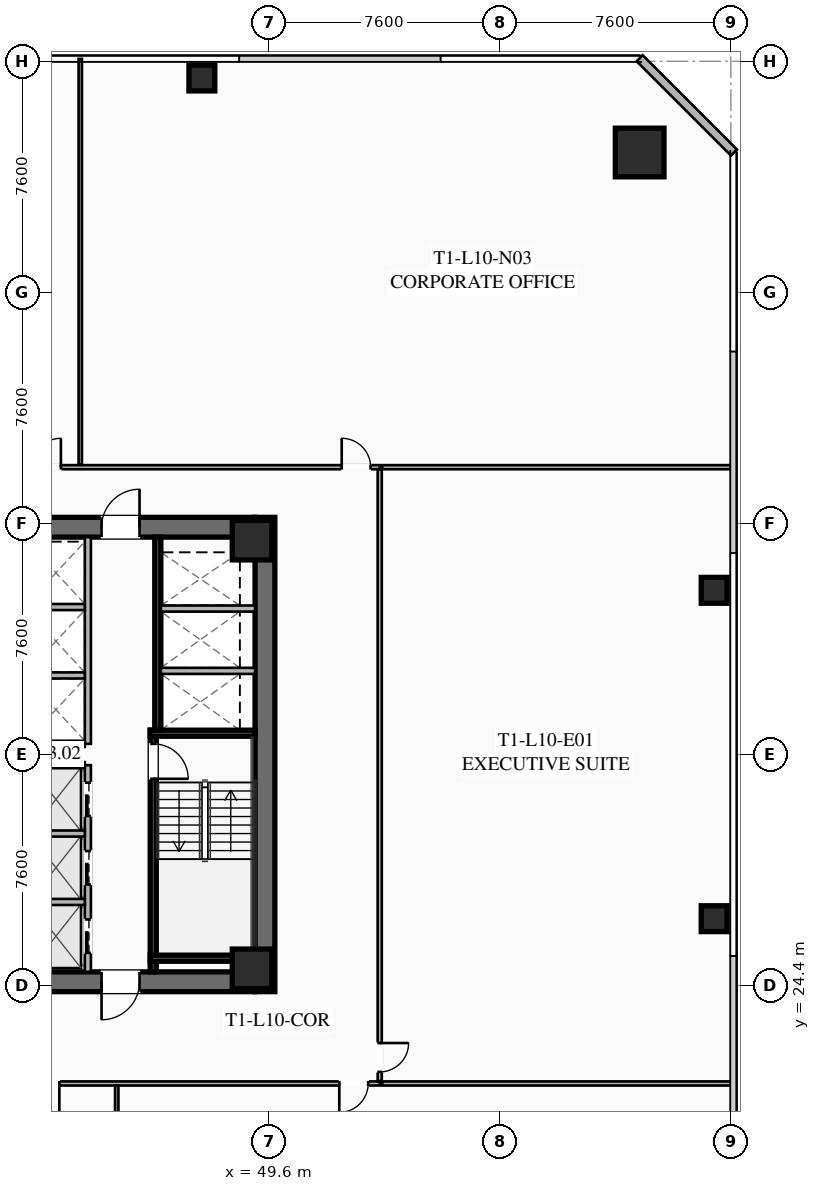
"""IFC4 building model, lengths in metres.
Left out: names, types, materials, properties, quantities, classifications, styles, units other than length and angle.
Written with IfcOpenShell. Run it as: python <this file> out.ifc"""

import sys

from ifc_helpers import new_model, si_unit, direction, frame, frame_2d, origin, origin_2d, place, context, subcontext, project, spatial, rectangle, hollow_rectangle, extrude, element, fill, save


model = new_model("IFC4")
c1 = context("Model", 3, precision=1e-05, world=origin(), true_north=direction((0.0, 1.0)))
c2 = subcontext(c1, "Body", "Model", "MODEL_VIEW")
j1 = project(units=[si_unit("LENGTHUNIT", "METRE"), si_unit("PLANEANGLEUNIT", "RADIAN")], contexts=[c1])
p1 = place(None, origin())
s1 = spatial("IfcSite", under=j1, at=p1, CompositionType="ELEMENT")
p2 = place(p1, origin())
s2 = spatial("IfcBuilding", under=s1, at=p2, CompositionType="ELEMENT")
p3 = place(p2, frame((0.0, 0.0, 42.35)))
s3 = spatial("IfcBuildingStorey", under=s2, at=p3, CompositionType="ELEMENT", Elevation=42.35)
p4 = place(p3, frame((49.475, 39.8, 0.0), z_axis=(0.0, 0.0, 1.0), x_axis=(0.0, -1.0, 0.0)))
e1 = element("IfcWall", 1, at=p4, inside=s3, PredefinedType="SHEAR", context=c2, shape_type="SweptSolid", body=[
    extrude(rectangle(XDim=15.6, YDim=0.65, at=frame_2d((7.8, 0.0))), origin(), (0.0, 0.0, 1.0), 3.55),
])
p5 = place(p3, frame((49.15, 24.525, 0.0), z_axis=(0.0, 0.0, 1.0), x_axis=(-1.0, 0.0, 0.0)))
e2 = element("IfcWall", 2, at=p5, inside=s3, PredefinedType="SHEAR", context=c2, shape_type="SweptSolid", body=[
    extrude(rectangle(XDim=14.3, YDim=0.65, at=frame_2d((7.15, 0.0))), origin(), (0.0, 0.0, 1.0), 3.55),
])
p6 = place(p5, frame((8.85, 0.0, 0.0)))
e3 = element("IfcOpeningElement", 3, at=p6, cuts=e2, PredefinedType="OPENING", context=c2, shape_type="SweptSolid", body=[
    extrude(rectangle(XDim=1.25, YDim=2.25, at=frame_2d((0.625, 1.125))), frame((0.0, 0.335, 0.0), z_axis=(0.0, -1.0, 0.0), x_axis=(1.0, 0.0, 0.0)), (0.0, 0.0, 1.0), 0.67),
])
p7 = place(p5, frame((3.8, 0.0, 0.0)))
e4 = element("IfcOpeningElement", 4, at=p7, cuts=e2, PredefinedType="OPENING", context=c2, shape_type="SweptSolid", body=[
    extrude(rectangle(XDim=1.25, YDim=2.25, at=frame_2d((0.625, 1.125))), frame((0.0, 0.335, 0.0), z_axis=(0.0, -1.0, 0.0), x_axis=(1.0, 0.0, 0.0)), (0.0, 0.0, 1.0), 0.67),
])
p8 = place(p3, frame((34.85, 39.475, 0.0), z_axis=(0.0, 0.0, 1.0), x_axis=(1.0, 0.0, 0.0)))
e5 = element("IfcWall", 5, at=p8, inside=s3, PredefinedType="SHEAR", context=c2, shape_type="SweptSolid", body=[
    extrude(rectangle(XDim=14.3, YDim=0.65, at=frame_2d((7.15, 0.0))), origin(), (0.0, 0.0, 1.0), 3.55),
])
p9 = place(p8, frame((4.2, 0.0, 0.0)))
e6 = element("IfcOpeningElement", 6, at=p9, cuts=e5, PredefinedType="OPENING", context=c2, shape_type="SweptSolid", body=[
    extrude(rectangle(XDim=1.25, YDim=2.25, at=frame_2d((0.625, 1.125))), frame((0.0, 0.335, 0.0), z_axis=(0.0, -1.0, 0.0), x_axis=(1.0, 0.0, 0.0)), (0.0, 0.0, 1.0), 0.67),
])
p10 = place(p8, frame((9.25, 0.0, 0.0)))
e7 = element("IfcOpeningElement", 7, at=p10, cuts=e5, PredefinedType="OPENING", context=c2, shape_type="SweptSolid", body=[
    extrude(rectangle(XDim=1.25, YDim=2.25, at=frame_2d((0.625, 1.125))), frame((0.0, 0.335, 0.0), z_axis=(0.0, -1.0, 0.0), x_axis=(1.0, 0.0, 0.0)), (0.0, 0.0, 1.0), 0.67),
])
for number, where, z_axis, x_axis in (
    (8, (49.05, 24.95, 0.0), (0.0, 0.0, 1.0), (1.0, 0.0, 0.0)),
    (9, (49.05, 39.05, 0.0), (0.0, 0.0, 1.0), (1.0, 0.0, 0.0)),
):
    element("IfcColumn", number, at=place(p3, frame(where, z_axis=z_axis, x_axis=x_axis)), inside=s3, PredefinedType="COLUMN", context=c2, shape_type="SweptSolid", body=[
        extrude(hollow_rectangle(XDim=1.3, YDim=1.3, WallThickness=0.05, at=origin_2d()), origin(), (0.0, 0.0, 1.0), 3.35),
    ])
p11 = place(p3, frame((61.8, 51.8, 0.0), z_axis=(0.0, 0.0, 1.0), x_axis=(1.0, 0.0, 0.0)))
e10 = element("IfcColumn", 10, at=p11, inside=s3, PredefinedType="COLUMN", context=c2, shape_type="SweptSolid", body=[
    extrude(hollow_rectangle(XDim=1.6, YDim=1.6, WallThickness=0.06, at=origin_2d()), origin(), (0.0, 0.0, 1.0), 3.35),
])
for number, where, z_axis, x_axis in (
    (11, (64.25, 26.6, 0.0), (0.0, 0.0, 1.0), (1.0, 0.0, 0.0)),
    (12, (64.25, 37.4, 0.0), (0.0, 0.0, 1.0), (1.0, 0.0, 0.0)),
    (13, (47.4, 54.25, 0.0), (0.0, 0.0, 1.0), (1.0, 0.0, 0.0)),
):
    element("IfcColumn", number, at=place(p3, frame(where, z_axis=z_axis, x_axis=x_axis)), inside=s3, PredefinedType="COLUMN", context=c2, shape_type="SweptSolid", body=[
        extrude(hollow_rectangle(XDim=0.85, YDim=0.85, WallThickness=0.035, at=origin_2d()), origin(), (0.0, 0.0, 1.0), 3.35),
    ])
p12 = place(p3, frame((61.8, 54.9, 0.0), z_axis=(0.0, 0.0, 1.0), x_axis=(0.707106781187, -0.707106781187, 0.0)))
e14 = element("IfcWall", 14, at=p12, inside=s3, PredefinedType="SOLIDWALL", context=c2, shape_type="SweptSolid", body=[
    extrude(rectangle(XDim=4.384, YDim=0.28, at=frame_2d((2.192, 0.0))), origin(), (0.0, 0.0, 1.0), 3.35),
])
p13 = place(p3, frame((45.8, 32.8, 0.0), z_axis=(0.0, 0.0, 1.0), x_axis=(0.0, -1.0, 0.0)))
e15 = element("IfcWall", 15, at=p13, inside=s3, PredefinedType="SHEAR", context=c2, shape_type="SweptSolid", body=[
    extrude(rectangle(XDim=7.95, YDim=0.2, at=frame_2d((3.975, 0.0))), origin(), (0.0, 0.0, 1.0), 3.35),
])
p14 = place(p13, frame((0.45, 0.0, 0.0)))
e16 = element("IfcOpeningElement", 16, at=p14, cuts=e15, PredefinedType="OPENING", context=c2, shape_type="SweptSolid", body=[
    extrude(rectangle(XDim=1.15, YDim=2.2, at=frame_2d((0.575, 1.1))), frame((0.0, 0.11, 0.0), z_axis=(0.0, -1.0, 0.0), x_axis=(1.0, 0.0, 0.0)), (0.0, 0.0, 1.0), 0.22),
])
for number, where, z_axis, x_axis in (
    (17, (45.7, 32.7, 0.0), (0.0, 0.0, 1.0), (1.0, 0.0, 0.0)),
    (18, (45.7, 25.3, 0.0), (0.0, 0.0, 1.0), (1.0, 0.0, 0.0)),
):
    element("IfcWall", number, at=place(p3, frame(where, z_axis=z_axis, x_axis=x_axis)), inside=s3, PredefinedType="SHEAR", context=c2, shape_type="SweptSolid", body=[
        extrude(rectangle(XDim=3.45, YDim=0.2, at=frame_2d((1.725, 0.0))), origin(), (0.0, 0.0, 1.0), 3.35),
    ])
p15 = place(p3, frame((45.95, 39.15, 0.0), z_axis=(0.0, 0.0, 1.0), x_axis=(0.0, -1.0, 0.0)))
e19 = element("IfcWall", 19, at=p15, inside=s3, PredefinedType="SHEAR", context=c2, shape_type="SweptSolid", body=[
    extrude(rectangle(XDim=6.35, YDim=0.2, at=frame_2d((3.175, 0.0))), origin(), (0.0, 0.0, 1.0), 3.35),
])
for number, where, z_axis, x_axis in (
    (20, (46.05, 34.75, 0.0), (0.0, 0.0, 1.0), (1.0, 0.0, 0.0)),
    (21, (46.05, 36.8, 0.0), (0.0, 0.0, 1.0), (1.0, 0.0, 0.0)),
):
    element("IfcWall", number, at=place(p3, frame(where, z_axis=z_axis, x_axis=x_axis)), inside=s3, PredefinedType="SOLIDWALL", context=c2, shape_type="SweptSolid", body=[
        extrude(rectangle(XDim=3.1, YDim=0.2, at=frame_2d((1.55, 0.0))), origin(), (0.0, 0.0, 1.0), 3.35),
    ])
p16 = place(p3, frame((43.65, 24.85, 0.0), z_axis=(0.0, 0.0, 1.0), x_axis=(0.0, 1.0, 0.0)))
e22 = element("IfcWall", 22, at=p16, inside=s3, PredefinedType="SOLIDWALL", context=c2, shape_type="SweptSolid", body=[
    extrude(rectangle(XDim=6.8, YDim=0.2, at=frame_2d((3.4, 0.0))), origin(), (0.0, 0.0, 1.0), 3.35),
])
p17 = place(p16, frame((0.625, 0.0, 0.0)))
e23 = element("IfcOpeningElement", 23, at=p17, cuts=e22, PredefinedType="OPENING", context=c2, shape_type="SweptSolid", body=[
    extrude(rectangle(XDim=1.1, YDim=2.2, at=frame_2d((0.55, 1.1))), frame((0.0, 0.11, 0.0), z_axis=(0.0, -1.0, 0.0), x_axis=(1.0, 0.0, 0.0)), (0.0, 0.0, 1.0), 0.22),
])
p18 = place(p16, frame((2.875, 0.0, 0.0)))
e24 = element("IfcOpeningElement", 24, at=p18, cuts=e22, PredefinedType="OPENING", context=c2, shape_type="SweptSolid", body=[
    extrude(rectangle(XDim=1.1, YDim=2.2, at=frame_2d((0.55, 1.1))), frame((0.0, 0.11, 0.0), z_axis=(0.0, -1.0, 0.0), x_axis=(1.0, 0.0, 0.0)), (0.0, 0.0, 1.0), 0.22),
])
p19 = place(p16, frame((5.125, 0.0, 0.0)))
e25 = element("IfcOpeningElement", 25, at=p19, cuts=e22, PredefinedType="OPENING", context=c2, shape_type="SweptSolid", body=[
    extrude(rectangle(XDim=1.1, YDim=2.2, at=frame_2d((0.55, 1.1))), frame((0.0, 0.11, 0.0), z_axis=(0.0, -1.0, 0.0), x_axis=(1.0, 0.0, 0.0)), (0.0, 0.0, 1.0), 0.22),
])
for number, where, z_axis, x_axis in (
    (26, (41.67, 27.15, 0.0), (0.0, 0.0, 1.0), (1.0, 0.0, 0.0)),
    (27, (41.67, 29.4, 0.0), (0.0, 0.0, 1.0), (1.0, 0.0, 0.0)),
    (28, (41.67, 31.65, 0.0), (0.0, 0.0, 1.0), (1.0, 0.0, 0.0)),
):
    element("IfcWall", number, at=place(p3, frame(where, z_axis=z_axis, x_axis=x_axis)), inside=s3, PredefinedType="SOLIDWALL", context=c2, shape_type="SweptSolid", body=[
        extrude(rectangle(XDim=1.88, YDim=0.2, at=frame_2d((0.94, 0.0))), origin(), (0.0, 0.0, 1.0), 3.35),
    ])
p20 = place(p3, frame((43.65, 32.35, 0.0), z_axis=(0.0, 0.0, 1.0), x_axis=(0.0, 1.0, 0.0)))
e29 = element("IfcWall", 29, at=p20, inside=s3, PredefinedType="SOLIDWALL", context=c2, shape_type="SweptSolid", body=[
    extrude(rectangle(XDim=6.8, YDim=0.2, at=frame_2d((3.4, 0.0))), origin(), (0.0, 0.0, 1.0), 3.35),
])
for number, where, z_axis, x_axis in (
    (30, (41.67, 32.35, 0.0), (0.0, 0.0, 1.0), (1.0, 0.0, 0.0)),
    (31, (41.67, 34.6, 0.0), (0.0, 0.0, 1.0), (1.0, 0.0, 0.0)),
    (32, (41.67, 36.85, 0.0), (0.0, 0.0, 1.0), (1.0, 0.0, 0.0)),
):
    element("IfcWall", number, at=place(p3, frame(where, z_axis=z_axis, x_axis=x_axis)), inside=s3, PredefinedType="SOLIDWALL", context=c2, shape_type="SweptSolid", body=[
        extrude(rectangle(XDim=1.88, YDim=0.2, at=frame_2d((0.94, 0.0))), origin(), (0.0, 0.0, 1.0), 3.35),
    ])
p21 = place(p3, frame((22.35, 41.45, 0.0), z_axis=(0.0, 0.0, 1.0), x_axis=(1.0, 0.0, 0.0)))
e33 = element("IfcWall", 33, at=p21, inside=s3, PredefinedType="PARTITIONING", context=c2, shape_type="SweptSolid", body=[
    extrude(rectangle(XDim=30.9, YDim=0.135, at=frame_2d((15.45, 0.0))), origin(), (0.0, 0.0, 1.0), 2.703),
])
p22 = place(p21, frame((0.3, 0.0, 0.0)))
e34 = element("IfcOpeningElement", 34, at=p22, cuts=e33, PredefinedType="OPENING", context=c2, shape_type="SweptSolid", body=[
    extrude(rectangle(XDim=0.95, YDim=2.05, at=frame_2d((0.475, 1.025))), frame((0.0, 0.077, 0.0), z_axis=(0.0, -1.0, 0.0), x_axis=(1.0, 0.0, 0.0)), (0.0, 0.0, 1.0), 0.155),
])
p23 = place(p21, frame((19.463, 0.0, 0.0)))
e35 = element("IfcOpeningElement", 35, at=p23, cuts=e33, PredefinedType="OPENING", context=c2, shape_type="SweptSolid", body=[
    extrude(rectangle(XDim=0.95, YDim=2.05, at=frame_2d((0.475, 1.025))), frame((0.0, 0.077, 0.0), z_axis=(0.0, -1.0, 0.0), x_axis=(1.0, 0.0, 0.0)), (0.0, 0.0, 1.0), 0.155),
])
p24 = place(p21, frame((29.65, 0.0, 0.0)))
e36 = element("IfcOpeningElement", 36, at=p24, cuts=e33, PredefinedType="OPENING", context=c2, shape_type="SweptSolid", body=[
    extrude(rectangle(XDim=0.95, YDim=2.05, at=frame_2d((0.475, 1.025))), frame((0.0, 0.077, 0.0), z_axis=(0.0, -1.0, 0.0), x_axis=(1.0, 0.0, 0.0)), (0.0, 0.0, 1.0), 0.155),
])
p25 = place(p3, frame((43.4, 41.53, 0.0), z_axis=(0.0, 0.0, 1.0), x_axis=(0.0, 1.0, 0.0)))
e37 = element("IfcWall", 37, at=p25, inside=s3, PredefinedType="PARTITIONING", context=c2, shape_type="SweptSolid", body=[
    extrude(rectangle(XDim=13.35, YDim=0.11, at=frame_2d((6.675, 0.0))), origin(), (0.0, 0.0, 1.0), 2.703),
])
p26 = place(p3, frame((53.25, 21.18, 0.0), z_axis=(0.0, 0.0, 1.0), x_axis=(-1.0, 0.0, 0.0)))
e38 = element("IfcWall", 38, at=p26, inside=s3, PredefinedType="PARTITIONING", context=c2, shape_type="SweptSolid", body=[
    extrude(rectangle(XDim=30.9, YDim=0.135, at=frame_2d((15.45, 0.0))), origin(), (0.0, 0.0, 1.0), 2.703),
])
p27 = place(p26, frame((29.57, 0.0, 0.0)))
e39 = element("IfcOpeningElement", 39, at=p27, cuts=e38, PredefinedType="OPENING", context=c2, shape_type="SweptSolid", body=[
    extrude(rectangle(XDim=0.95, YDim=2.05, at=frame_2d((0.475, 1.025))), frame((0.0, 0.077, 0.0), z_axis=(0.0, -1.0, 0.0), x_axis=(1.0, 0.0, 0.0)), (0.0, 0.0, 1.0), 0.155),
])
p28 = place(p26, frame((10.538, 0.0, 0.0)))
e40 = element("IfcOpeningElement", 40, at=p28, cuts=e38, PredefinedType="OPENING", context=c2, shape_type="SweptSolid", body=[
    extrude(rectangle(XDim=0.95, YDim=2.05, at=frame_2d((0.475, 1.025))), frame((0.0, 0.077, 0.0), z_axis=(0.0, -1.0, 0.0), x_axis=(1.0, 0.0, 0.0)), (0.0, 0.0, 1.0), 0.155),
])
p29 = place(p26, frame((0.38, 0.0, 0.0)))
e41 = element("IfcOpeningElement", 41, at=p29, cuts=e38, PredefinedType="OPENING", context=c2, shape_type="SweptSolid", body=[
    extrude(rectangle(XDim=0.95, YDim=2.05, at=frame_2d((0.475, 1.025))), frame((0.0, 0.077, 0.0), z_axis=(0.0, -1.0, 0.0), x_axis=(1.0, 0.0, 0.0)), (0.0, 0.0, 1.0), 0.155),
])
p30 = place(p3, frame((44.6, 9.12, 0.0), z_axis=(0.0, 0.0, 1.0), x_axis=(0.0, 1.0, 0.0)))
e42 = element("IfcWall", 42, at=p30, inside=s3, PredefinedType="PARTITIONING", context=c2, shape_type="SweptSolid", body=[
    extrude(rectangle(XDim=11.98, YDim=0.11, at=frame_2d((5.99, 0.0))), origin(), (0.0, 0.0, 1.0), 2.703),
])
p31 = place(p3, frame((53.25, 41.37, 0.0), z_axis=(0.0, 0.0, 1.0), x_axis=(0.0, -1.0, 0.0)))
e43 = element("IfcWall", 43, at=p31, inside=s3, PredefinedType="PARTITIONING", context=c2, shape_type="SweptSolid", body=[
    extrude(rectangle(XDim=20.11, YDim=0.135, at=frame_2d((10.055, 0.0))), origin(), (0.0, 0.0, 1.0), 2.703),
])
p32 = place(p31, frame((18.86, 0.0, 0.0)))
e44 = element("IfcOpeningElement", 44, at=p32, cuts=e43, PredefinedType="OPENING", context=c2, shape_type="SweptSolid", body=[
    extrude(rectangle(XDim=0.95, YDim=2.05, at=frame_2d((0.475, 1.025))), frame((0.0, 0.077, 0.0), z_axis=(0.0, -1.0, 0.0), x_axis=(1.0, 0.0, 0.0)), (0.0, 0.0, 1.0), 0.155),
])
for number, where, z_axis, x_axis in (
    (45, (64.88, 41.45, 0.0), (0.0, 0.0, 1.0), (-1.0, 0.0, 0.0)),
    (46, (53.33, 21.18, 0.0), (0.0, 0.0, 1.0), (1.0, 0.0, 0.0)),
):
    element("IfcWall", number, at=place(p3, frame(where, z_axis=z_axis, x_axis=x_axis)), inside=s3, PredefinedType="PARTITIONING", context=c2, shape_type="SweptSolid", body=[
        extrude(rectangle(XDim=11.55, YDim=0.135, at=frame_2d((5.775, 0.0))), origin(), (0.0, 0.0, 1.0), 2.703),
    ])
p33 = place(p10, origin())
e47 = element("IfcDoor", 47, at=p33, inside=s3, OperationType="SINGLE_SWING_RIGHT", PredefinedType="DOOR", context=c2, shape_type="SweptSolid", body=[
    extrude(rectangle(XDim=1.25, YDim=2.25, at=frame_2d((0.625, 1.125))), frame((0.0, 0.025, 0.0), z_axis=(0.0, -1.0, 0.0), x_axis=(1.0, 0.0, 0.0)), (0.0, 0.0, 1.0), 0.05),
])
fill(e7, e47)
p34 = place(p7, origin())
e48 = element("IfcDoor", 48, at=p34, inside=s3, OperationType="SINGLE_SWING_RIGHT", PredefinedType="DOOR", context=c2, shape_type="SweptSolid", body=[
    extrude(rectangle(XDim=1.25, YDim=2.25, at=frame_2d((0.625, 1.125))), frame((0.0, 0.025, 0.0), z_axis=(0.0, -1.0, 0.0), x_axis=(1.0, 0.0, 0.0)), (0.0, 0.0, 1.0), 0.05),
])
fill(e4, e48)
p35 = place(p14, origin())
e49 = element("IfcDoor", 49, at=p35, inside=s3, OperationType="SINGLE_SWING_RIGHT", PredefinedType="DOOR", context=c2, shape_type="SweptSolid", body=[
    extrude(rectangle(XDim=1.15, YDim=2.2, at=frame_2d((0.575, 1.1))), frame((0.0, 0.025, 0.0), z_axis=(0.0, -1.0, 0.0), x_axis=(1.0, 0.0, 0.0)), (0.0, 0.0, 1.0), 0.05),
])
fill(e16, e49)
p36 = place(p23, origin())
e50 = element("IfcDoor", 50, at=p36, inside=s3, OperationType="SINGLE_SWING_RIGHT", PredefinedType="DOOR", context=c2, shape_type="SweptSolid", body=[
    extrude(rectangle(XDim=0.95, YDim=2.05, at=frame_2d((0.475, 1.025))), frame((0.0, 0.025, 0.0), z_axis=(0.0, -1.0, 0.0), x_axis=(1.0, 0.0, 0.0)), (0.0, 0.0, 1.0), 0.05),
])
fill(e35, e50)
p37 = place(p24, origin())
e51 = element("IfcDoor", 51, at=p37, inside=s3, OperationType="SINGLE_SWING_LEFT", PredefinedType="DOOR", context=c2, shape_type="SweptSolid", body=[
    extrude(rectangle(XDim=0.95, YDim=2.05, at=frame_2d((0.475, 1.025))), frame((0.0, 0.025, 0.0), z_axis=(0.0, -1.0, 0.0), x_axis=(1.0, 0.0, 0.0)), (0.0, 0.0, 1.0), 0.05),
])
fill(e36, e51)
p38 = place(p28, origin())
e52 = element("IfcDoor", 52, at=p38, inside=s3, OperationType="SINGLE_SWING_LEFT", PredefinedType="DOOR", context=c2, shape_type="SweptSolid", body=[
    extrude(rectangle(XDim=0.95, YDim=2.05, at=frame_2d((0.475, 1.025))), frame((0.0, 0.025, 0.0), z_axis=(0.0, -1.0, 0.0), x_axis=(1.0, 0.0, 0.0)), (0.0, 0.0, 1.0), 0.05),
])
fill(e40, e52)
p39 = place(p29, origin())
e53 = element("IfcDoor", 53, at=p39, inside=s3, OperationType="SINGLE_SWING_RIGHT", PredefinedType="DOOR", context=c2, shape_type="SweptSolid", body=[
    extrude(rectangle(XDim=0.95, YDim=2.05, at=frame_2d((0.475, 1.025))), frame((0.0, 0.025, 0.0), z_axis=(0.0, -1.0, 0.0), x_axis=(1.0, 0.0, 0.0)), (0.0, 0.0, 1.0), 0.05),
])
fill(e41, e53)
p40 = place(p32, origin())
e54 = element("IfcDoor", 54, at=p40, inside=s3, OperationType="SINGLE_SWING_LEFT", PredefinedType="DOOR", context=c2, shape_type="SweptSolid", body=[
    extrude(rectangle(XDim=0.95, YDim=2.05, at=frame_2d((0.475, 1.025))), frame((0.0, 0.025, 0.0), z_axis=(0.0, -1.0, 0.0), x_axis=(1.0, 0.0, 0.0)), (0.0, 0.0, 1.0), 0.05),
])
fill(e44, e54)
p41 = place(p17, origin())
e55 = element("IfcDoor", 55, at=p41, inside=s3, OperationType="SLIDING_TO_LEFT", PredefinedType="DOOR", context=c2, shape_type="SweptSolid", body=[
    extrude(rectangle(XDim=1.1, YDim=2.2, at=frame_2d((0.55, 1.1))), frame((0.0, 0.025, 0.0), z_axis=(0.0, -1.0, 0.0), x_axis=(1.0, 0.0, 0.0)), (0.0, 0.0, 1.0), 0.05),
])
fill(e23, e55)
p42 = place(p18, origin())
e56 = element("IfcDoor", 56, at=p42, inside=s3, OperationType="SLIDING_TO_LEFT", PredefinedType="DOOR", context=c2, shape_type="SweptSolid", body=[
    extrude(rectangle(XDim=1.1, YDim=2.2, at=frame_2d((0.55, 1.1))), frame((0.0, 0.025, 0.0), z_axis=(0.0, -1.0, 0.0), x_axis=(1.0, 0.0, 0.0)), (0.0, 0.0, 1.0), 0.05),
])
fill(e24, e56)
p43 = place(p19, origin())
e57 = element("IfcDoor", 57, at=p43, inside=s3, OperationType="SLIDING_TO_LEFT", PredefinedType="DOOR", context=c2, shape_type="SweptSolid", body=[
    extrude(rectangle(XDim=1.1, YDim=2.2, at=frame_2d((0.55, 1.1))), frame((0.0, 0.025, 0.0), z_axis=(0.0, -1.0, 0.0), x_axis=(1.0, 0.0, 0.0)), (0.0, 0.0, 1.0), 0.05),
])
fill(e25, e57)
save(model, sys.argv[1])
